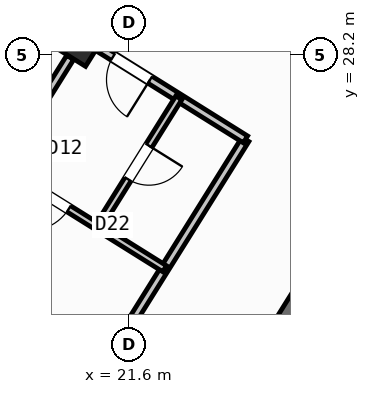
"""IFC4 building model, lengths in metres.
Left out: names, types, materials, properties, quantities, classifications, styles, units other than length and angle.
Written with IfcOpenShell. Run it as: python <this file> out.ifc"""

import sys

from ifc_helpers import new_model, si_unit, direction, frame, frame_2d, origin, origin_2d, place, context, subcontext, project, spatial, rectangle, hollow_rectangle, extrude, source, transform, mapped, element, fill, save


model = new_model("IFC4")
c1 = context("Model", 3, precision=1e-05, world=origin(), true_north=direction((0.0, 1.0)))
c2 = subcontext(c1, "Body", "Model", "MODEL_VIEW")
j1 = project(units=[si_unit("LENGTHUNIT", "METRE"), si_unit("PLANEANGLEUNIT", "RADIAN")], contexts=[c1])
p1 = place(None, origin())
s1 = spatial("IfcSite", under=j1, at=p1, CompositionType="ELEMENT")
p2 = place(p1, origin())
s2 = spatial("IfcBuilding", under=s1, at=p2, CompositionType="ELEMENT")
p3 = place(p2, frame((0.0, 0.0, 259.2)))
s3 = spatial("IfcBuildingStorey", under=s2, at=p3, CompositionType="ELEMENT", Elevation=259.2)
p4 = place(p3, frame((26.007, 24.976, 0.0), z_axis=(0.0, 0.0, 1.0), x_axis=(-0.529931155655, -0.848040665456, 0.0)))
e1 = element("IfcWall", 1, at=p4, inside=s3, PredefinedType="SHEAR", context=c2, shape_type="SweptSolid", body=[
    extrude(rectangle(XDim=6.475, YDim=0.45, at=frame_2d((3.238, 0.0))), origin(), (0.0, 0.0, 1.0), 3.35),
])
m1 = source(origin(), c2, "Body", "SweptSolid", [
    extrude(hollow_rectangle(XDim=0.7, YDim=0.7, WallThickness=0.028, at=origin_2d()), origin(), (0.0, 0.0, 1.0), 3.6),
])
p5 = place(p3, frame((20.632, 28.452, 0.0), z_axis=(0.0, 0.0, 1.0), x_axis=(-0.848048096156, 0.529919264233, 0.0)))
e2 = element("IfcColumn", 2, at=p5, inside=s3, PredefinedType="COLUMN", context=c2, shape_type="MappedRepresentation", body=[
    mapped(m1, transform((0.0, 0.0, 0.0), scale=1.0)),
])
p6 = place(p3, frame((29.268, 6.429, 0.0), z_axis=(0.0, 0.0, 1.0), x_axis=(-0.848049971435, 0.529916263149, 0.0)))
e3 = element("IfcWall", 3, at=p6, inside=s3, PredefinedType="STANDARD", context=c2, shape_type="SweptSolid", body=[
    extrude(rectangle(XDim=31.588, YDim=0.32, at=frame_2d((15.794, 0.0))), origin(), (0.0, 0.0, 1.0), 3.35),
])
p7 = place(p6, frame((16.362, 0.0, 0.0)))
e4 = element("IfcOpeningElement", 4, at=p7, cuts=e3, PredefinedType="OPENING", context=c2, shape_type="SweptSolid", body=[
    extrude(rectangle(XDim=1.2, YDim=2.15, at=frame_2d((0.6, 1.075))), frame((0.0, 0.17, 0.0), z_axis=(0.0, -1.0, 0.0), x_axis=(1.0, 0.0, 0.0)), (0.0, 0.0, 1.0), 0.34),
])
p8 = place(p6, frame((3.859, 0.0, 0.9)))
e5 = element("IfcOpeningElement", 5, at=p8, cuts=e3, PredefinedType="OPENING", context=c2, shape_type="SweptSolid", body=[
    extrude(rectangle(XDim=1.65, YDim=1.45, at=frame_2d((0.825, 0.725))), frame((0.0, 0.17, 0.0), z_axis=(0.0, -1.0, 0.0), x_axis=(1.0, 0.0, 0.0)), (0.0, 0.0, 1.0), 0.34),
])
p9 = place(p6, frame((10.519, 0.0, 0.9)))
e6 = element("IfcOpeningElement", 6, at=p9, cuts=e3, PredefinedType="OPENING", context=c2, shape_type="SweptSolid", body=[
    extrude(rectangle(XDim=1.65, YDim=1.45, at=frame_2d((0.825, 0.725))), frame((0.0, 0.17, 0.0), z_axis=(0.0, -1.0, 0.0), x_axis=(1.0, 0.0, 0.0)), (0.0, 0.0, 1.0), 0.34),
])
p10 = place(p6, frame((28.413, 0.0, 0.95)))
e7 = element("IfcOpeningElement", 7, at=p10, cuts=e3, PredefinedType="OPENING", context=c2, shape_type="SweptSolid", body=[
    extrude(rectangle(XDim=1.95, YDim=1.35, at=frame_2d((0.975, 0.675))), frame((0.0, 0.17, 0.0), z_axis=(0.0, -1.0, 0.0), x_axis=(1.0, 0.0, 0.0)), (0.0, 0.0, 1.0), 0.34),
])
p11 = place(p6, frame((19.699, 0.0, 1.0)))
e8 = element("IfcOpeningElement", 8, at=p11, cuts=e3, PredefinedType="OPENING", context=c2, shape_type="SweptSolid", body=[
    extrude(rectangle(XDim=0.65, YDim=1.15, at=frame_2d((0.325, 0.575))), frame((0.0, 0.17, 0.0), z_axis=(0.0, -1.0, 0.0), x_axis=(1.0, 0.0, 0.0)), (0.0, 0.0, 1.0), 0.34),
])
p12 = place(p6, frame((21.721, 0.0, 1.0)))
e9 = element("IfcOpeningElement", 9, at=p12, cuts=e3, PredefinedType="OPENING", context=c2, shape_type="SweptSolid", body=[
    extrude(rectangle(XDim=0.65, YDim=1.15, at=frame_2d((0.325, 0.575))), frame((0.0, 0.17, 0.0), z_axis=(0.0, -1.0, 0.0), x_axis=(1.0, 0.0, 0.0)), (0.0, 0.0, 1.0), 0.34),
])
p13 = place(p6, frame((23.756, 0.0, 1.0)))
e10 = element("IfcOpeningElement", 10, at=p13, cuts=e3, PredefinedType="OPENING", context=c2, shape_type="SweptSolid", body=[
    extrude(rectangle(XDim=0.65, YDim=1.15, at=frame_2d((0.325, 0.575))), frame((0.0, 0.17, 0.0), z_axis=(0.0, -1.0, 0.0), x_axis=(1.0, 0.0, 0.0)), (0.0, 0.0, 1.0), 0.34),
])
p14 = place(p6, frame((25.791, 0.0, 1.0)))
e11 = element("IfcOpeningElement", 11, at=p14, cuts=e3, PredefinedType="OPENING", context=c2, shape_type="SweptSolid", body=[
    extrude(rectangle(XDim=0.65, YDim=1.15, at=frame_2d((0.325, 0.575))), frame((0.0, 0.17, 0.0), z_axis=(0.0, -1.0, 0.0), x_axis=(1.0, 0.0, 0.0)), (0.0, 0.0, 1.0), 0.34),
])
p15 = place(p3, frame((14.138, 41.825, 0.0), z_axis=(0.0, 0.0, 1.0), x_axis=(0.848046498049, -0.529921821731, 0.0)))
e12 = element("IfcWall", 12, at=p15, inside=s3, PredefinedType="STANDARD", context=c2, shape_type="SweptSolid", body=[
    extrude(rectangle(XDim=31.588, YDim=0.32, at=frame_2d((15.794, 0.0))), origin(), (0.0, 0.0, 1.0), 3.35),
])
p16 = place(p15, frame((9.753, 0.0, 0.0)))
e13 = element("IfcOpeningElement", 13, at=p16, cuts=e12, PredefinedType="OPENING", context=c2, shape_type="SweptSolid", body=[
    extrude(rectangle(XDim=1.05, YDim=2.15, at=frame_2d((0.525, 1.075))), frame((0.0, 0.17, 0.0), z_axis=(0.0, -1.0, 0.0), x_axis=(1.0, 0.0, 0.0)), (0.0, 0.0, 1.0), 0.34),
])
p17 = place(p15, frame((0.816, 0.0, 0.9)))
e14 = element("IfcOpeningElement", 14, at=p17, cuts=e12, PredefinedType="OPENING", context=c2, shape_type="SweptSolid", body=[
    extrude(rectangle(XDim=1.65, YDim=1.45, at=frame_2d((0.825, 0.725))), frame((0.0, 0.17, 0.0), z_axis=(0.0, -1.0, 0.0), x_axis=(1.0, 0.0, 0.0)), (0.0, 0.0, 1.0), 0.34),
])
p18 = place(p15, frame((4.196, 0.0, 1.0)))
e15 = element("IfcOpeningElement", 15, at=p18, cuts=e12, PredefinedType="OPENING", context=c2, shape_type="SweptSolid", body=[
    extrude(rectangle(XDim=0.9, YDim=1.25, at=frame_2d((0.45, 0.625))), frame((0.0, 0.17, 0.0), z_axis=(0.0, -1.0, 0.0), x_axis=(1.0, 0.0, 0.0)), (0.0, 0.0, 1.0), 0.34),
])
p19 = place(p15, frame((7.188, 0.0, 0.95)))
e16 = element("IfcOpeningElement", 16, at=p19, cuts=e12, PredefinedType="OPENING", context=c2, shape_type="SweptSolid", body=[
    extrude(rectangle(XDim=1.95, YDim=1.35, at=frame_2d((0.975, 0.675))), frame((0.0, 0.17, 0.0), z_axis=(0.0, -1.0, 0.0), x_axis=(1.0, 0.0, 0.0)), (0.0, 0.0, 1.0), 0.34),
])
p20 = place(p15, frame((14.124, 0.0, 1.0)))
e17 = element("IfcOpeningElement", 17, at=p20, cuts=e12, PredefinedType="OPENING", context=c2, shape_type="SweptSolid", body=[
    extrude(rectangle(XDim=0.9, YDim=1.25, at=frame_2d((0.45, 0.625))), frame((0.0, 0.17, 0.0), z_axis=(0.0, -1.0, 0.0), x_axis=(1.0, 0.0, 0.0)), (0.0, 0.0, 1.0), 0.34),
])
p21 = place(p15, frame((17.154, 0.0, 1.0)))
e18 = element("IfcOpeningElement", 18, at=p21, cuts=e12, PredefinedType="OPENING", context=c2, shape_type="SweptSolid", body=[
    extrude(rectangle(XDim=0.9, YDim=1.25, at=frame_2d((0.45, 0.625))), frame((0.0, 0.17, 0.0), z_axis=(0.0, -1.0, 0.0), x_axis=(1.0, 0.0, 0.0)), (0.0, 0.0, 1.0), 0.34),
])
p22 = place(p15, frame((21.869, 0.0, 0.9)))
e19 = element("IfcOpeningElement", 19, at=p22, cuts=e12, PredefinedType="OPENING", context=c2, shape_type="SweptSolid", body=[
    extrude(rectangle(XDim=1.35, YDim=1.45, at=frame_2d((0.675, 0.725))), frame((0.0, 0.17, 0.0), z_axis=(0.0, -1.0, 0.0), x_axis=(1.0, 0.0, 0.0)), (0.0, 0.0, 1.0), 0.34),
])
p23 = place(p15, frame((27.569, 0.0, 0.9)))
e20 = element("IfcOpeningElement", 20, at=p23, cuts=e12, PredefinedType="OPENING", context=c2, shape_type="SweptSolid", body=[
    extrude(rectangle(XDim=1.35, YDim=1.45, at=frame_2d((0.675, 0.725))), frame((0.0, 0.17, 0.0), z_axis=(0.0, -1.0, 0.0), x_axis=(1.0, 0.0, 0.0)), (0.0, 0.0, 1.0), 0.34),
])
p24 = place(p3, frame((23.899, 26.529, 0.0), z_axis=(0.0, 0.0, 1.0), x_axis=(-0.529917716469, -0.848049063305, 0.0)))
e21 = element("IfcWall", 21, at=p24, inside=s3, PredefinedType="PARTITIONING", context=c2, shape_type="SweptSolid", body=[
    extrude(rectangle(XDim=14.05, YDim=0.16, at=frame_2d((7.025, 0.0))), origin(), (0.0, 0.0, 1.0), 3.34),
])
p25 = place(p3, frame((23.899, 26.529, 0.0), z_axis=(0.0, 0.0, 1.0), x_axis=(-0.84807831592, 0.529870899433, 0.0)))
e22 = element("IfcWall", 22, at=p25, inside=s3, PredefinedType="PARTITIONING", context=c2, shape_type="SweptSolid", body=[
    extrude(rectangle(XDim=3.428, YDim=0.16, at=frame_2d((1.714, 0.0))), origin(), (0.0, 0.0, 1.0), 2.875),
])
p26 = place(p25, frame((2.22, 0.0, 0.0)))
e23 = element("IfcOpeningElement", 23, at=p26, cuts=e22, PredefinedType="OPENING", context=c2, shape_type="SweptSolid", body=[
    extrude(rectangle(XDim=0.86, YDim=2.05, at=frame_2d((0.43, 1.025))), frame((0.0, 0.09, 0.0), z_axis=(0.0, -1.0, 0.0), x_axis=(1.0, 0.0, 0.0)), (0.0, 0.0, 1.0), 0.18),
])
p27 = place(p3, frame((20.44, 28.145, 0.0), z_axis=(0.0, 0.0, 1.0), x_axis=(-0.529938869374, -0.84803584519, 0.0)))
e24 = element("IfcWall", 24, at=p27, inside=s3, PredefinedType="PARTITIONING", context=c2, shape_type="SweptSolid", body=[
    extrude(rectangle(XDim=6.576, YDim=0.16, at=frame_2d((3.288, 0.0))), origin(), (0.0, 0.0, 1.0), 2.875),
])
p28 = place(p3, frame((22.304, 23.976, 0.0), z_axis=(0.0, 0.0, 1.0), x_axis=(-0.84803087207, 0.529946827537, 0.0)))
e25 = element("IfcWall", 25, at=p28, inside=s3, PredefinedType="PLUMBINGWALL", context=c2, shape_type="SweptSolid", body=[
    extrude(rectangle(XDim=3.79, YDim=0.14, at=frame_2d((1.895, 0.0))), origin(), (0.0, 0.0, 1.0), 3.34),
])
p29 = place(p28, frame((2.23, 0.0, 0.0)))
e26 = element("IfcOpeningElement", 26, at=p29, cuts=e25, PredefinedType="OPENING", context=c2, shape_type="SweptSolid", body=[
    extrude(rectangle(XDim=0.92, YDim=2.08, at=frame_2d((0.46, 1.04))), frame((0.0, 0.08, 0.0), z_axis=(0.0, -1.0, 0.0), x_axis=(1.0, 0.0, 0.0)), (0.0, 0.0, 1.0), 0.16),
])
p30 = place(p3, frame((22.585, 27.35, 0.0), z_axis=(0.0, 0.0, 1.0), x_axis=(-0.529977067289, -0.848011974059, 0.0)))
e27 = element("IfcWall", 27, at=p30, inside=s3, PredefinedType="PLUMBINGWALL", context=c2, shape_type="SweptSolid", body=[
    extrude(rectangle(XDim=3.01, YDim=0.14, at=frame_2d((1.505, 0.0))), origin(), (0.0, 0.0, 1.0), 3.025),
])
p31 = place(p30, frame((1.115, 0.0, 0.0)))
e28 = element("IfcOpeningElement", 28, at=p31, cuts=e27, PredefinedType="OPENING", context=c2, shape_type="SweptSolid", body=[
    extrude(rectangle(XDim=0.78, YDim=2.05, at=frame_2d((0.39, 1.025))), frame((0.0, 0.08, 0.0), z_axis=(0.0, -1.0, 0.0), x_axis=(1.0, 0.0, 0.0)), (0.0, 0.0, 1.0), 0.16),
])
m2 = source(origin(), c2, "Body", "SweptSolid", [
    extrude(rectangle(XDim=0.86, YDim=2.05, at=frame_2d((0.43, 1.025))), frame((0.0, 0.025, 0.0), z_axis=(0.0, -1.0, 0.0), x_axis=(1.0, 0.0, 0.0)), (0.0, 0.0, 1.0), 0.05),
])
p32 = place(p26, origin())
e29 = element("IfcDoor", 29, at=p32, inside=s3, OperationType="SINGLE_SWING_LEFT", PredefinedType="DOOR", context=c2, shape_type="MappedRepresentation", body=[
    mapped(m2, transform((0.0, 0.0, 0.0), scale=1.0)),
])
fill(e23, e29)
m3 = source(origin(), c2, "Body", "SweptSolid", [
    extrude(rectangle(XDim=0.92, YDim=2.08, at=frame_2d((0.46, 1.04))), frame((0.0, 0.025, 0.0), z_axis=(0.0, -1.0, 0.0), x_axis=(1.0, 0.0, 0.0)), (0.0, 0.0, 1.0), 0.05),
])
p33 = place(p29, origin())
e30 = element("IfcDoor", 30, at=p33, inside=s3, OperationType="SINGLE_SWING_RIGHT", PredefinedType="DOOR", context=c2, shape_type="MappedRepresentation", body=[
    mapped(m3, transform((0.0, 0.0, 0.0), scale=1.0)),
])
fill(e26, e30)
m4 = source(origin(), c2, "Body", "SweptSolid", [
    extrude(rectangle(XDim=0.78, YDim=2.05, at=frame_2d((0.39, 1.025))), frame((0.0, 0.025, 0.0), z_axis=(0.0, -1.0, 0.0), x_axis=(1.0, 0.0, 0.0)), (0.0, 0.0, 1.0), 0.05),
])
p34 = place(p31, origin())
e31 = element("IfcDoor", 31, at=p34, inside=s3, OperationType="SINGLE_SWING_LEFT", PredefinedType="DOOR", context=c2, shape_type="MappedRepresentation", body=[
    mapped(m4, transform((0.0, 0.0, 0.0), scale=1.0)),
])
fill(e28, e31)
save(model, sys.argv[1])
